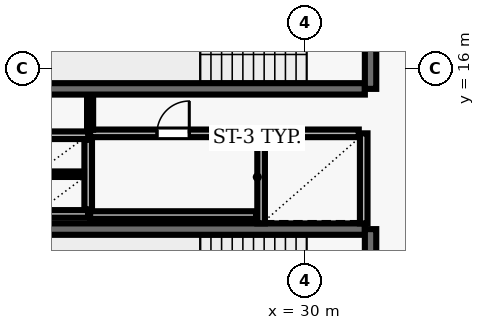
"""IFC4 building model, lengths in metres.
Left out: names, types, materials, properties, quantities, classifications, styles, units other than length and angle.
Written with IfcOpenShell. Run it as: python <this file> out.ifc"""

import sys

from ifc_helpers import new_model, si_unit, direction, frame, frame_2d, origin, place, context, subcontext, project, spatial, rectangle, extrude, element, fill, save


model = new_model("IFC4")
c1 = context("Model", 3, precision=1e-05, world=origin(), true_north=direction((0.0, 1.0)))
c2 = subcontext(c1, "Body", "Model", "MODEL_VIEW")
j1 = project(units=[si_unit("LENGTHUNIT", "METRE"), si_unit("PLANEANGLEUNIT", "RADIAN")], contexts=[c1])
p1 = place(None, origin())
s1 = spatial("IfcSite", under=j1, at=p1, CompositionType="ELEMENT")
p2 = place(p1, origin())
s2 = spatial("IfcBuilding", under=s1, at=p2, CompositionType="ELEMENT")
p3 = place(p2, frame((0.0, 0.0, 85.6)))
s3 = spatial("IfcBuildingStorey", under=s2, at=p3, CompositionType="ELEMENT", Elevation=85.6)
p4 = place(p3, frame((23.22, 15.47, 0.0), z_axis=(0.0, 0.0, 1.0), x_axis=(1.0, 0.0, 0.0)))
e1 = element("IfcWall", 1, at=p4, inside=s3, PredefinedType="SHEAR", context=c2, shape_type="SweptSolid", body=[
    extrude(rectangle(XDim=8.36, YDim=0.3, at=frame_2d((4.18, 0.0))), origin(), (0.0, 0.0, 1.0), 3.69),
])
p5 = place(p3, frame((31.73, 15.47, 0.0), z_axis=(0.0, 0.0, 1.0), x_axis=(0.0, 1.0, 0.0)))
e2 = element("IfcWall", 2, at=p5, inside=s3, PredefinedType="SHEAR", context=c2, shape_type="SweptSolid", body=[
    extrude(rectangle(XDim=3.51, YDim=0.3, at=frame_2d((1.755, 0.0))), origin(), (0.0, 0.0, 1.0), 3.69),
])
p6 = place(p5, frame((1.18, 0.0, 0.0)))
e3 = element("IfcOpeningElement", 3, at=p6, cuts=e2, PredefinedType="OPENING", context=c2, shape_type="SweptSolid", body=[
    extrude(rectangle(XDim=1.15, YDim=2.15, at=frame_2d((0.575, 1.075))), frame((0.0, 0.16, 0.0), z_axis=(0.0, -1.0, 0.0), x_axis=(1.0, 0.0, 0.0)), (0.0, 0.0, 1.0), 0.32),
])
p7 = place(p3, frame((31.58, 11.78, 0.0), z_axis=(0.0, 0.0, 1.0), x_axis=(-1.0, 0.0, 0.0)))
e4 = element("IfcWall", 4, at=p7, inside=s3, PredefinedType="SHEAR", context=c2, shape_type="SweptSolid", body=[
    extrude(rectangle(XDim=8.36, YDim=0.3, at=frame_2d((4.18, 0.0))), origin(), (0.0, 0.0, 1.0), 3.69),
])
p8 = place(p3, frame((31.73, 8.27, 0.0), z_axis=(0.0, 0.0, 1.0), x_axis=(0.0, 1.0, 0.0)))
e5 = element("IfcWall", 5, at=p8, inside=s3, PredefinedType="SHEAR", context=c2, shape_type="SweptSolid", body=[
    extrude(rectangle(XDim=3.51, YDim=0.3, at=frame_2d((1.755, 0.0))), origin(), (0.0, 0.0, 1.0), 3.69),
])
p9 = place(p8, frame((1.18, 0.0, 0.0)))
e6 = element("IfcOpeningElement", 6, at=p9, cuts=e5, PredefinedType="OPENING", context=c2, shape_type="SweptSolid", body=[
    extrude(rectangle(XDim=1.15, YDim=2.15, at=frame_2d((0.575, 1.075))), frame((0.0, 0.16, 0.0), z_axis=(0.0, -1.0, 0.0), x_axis=(1.0, 0.0, 0.0)), (0.0, 0.0, 1.0), 0.32),
])
for number, where, z_axis, x_axis in (
    (7, (28.85, 14.3, 0.0), (0.0, 0.0, 1.0), (0.0, -1.0, 0.0)),
    (8, (31.55, 11.93, 0.0), (0.0, 0.0, 1.0), (0.0, 1.0, 0.0)),
):
    element("IfcWall", number, at=place(p3, frame(where, z_axis=z_axis, x_axis=x_axis)), inside=s3, PredefinedType="SOLIDWALL", context=c2, shape_type="SweptSolid", body=[
        extrude(rectangle(XDim=2.37, YDim=0.2, at=frame_2d((1.185, 0.0))), origin(), (0.0, 0.0, 1.0), 3.69),
    ])
p10 = place(p3, frame((31.42, 14.3, 0.0), z_axis=(0.0, 0.0, 1.0), x_axis=(-1.0, 0.0, 0.0)))
e9 = element("IfcWall", 9, at=p10, inside=s3, PredefinedType="SOLIDWALL", context=c2, shape_type="SweptSolid", body=[
    extrude(rectangle(XDim=2.44, YDim=0.2, at=frame_2d((1.22, 0.0))), origin(), (0.0, 0.0, 1.0), 3.69),
])
for number, where, z_axis, x_axis in (
    (10, (22.9, 14.25, 0.0), (0.0, 0.0, 1.0), (1.0, 0.0, 0.0)),
    (11, (22.9, 12.18, 0.0), (0.0, 0.0, 1.0), (1.0, 0.0, 0.0)),
):
    element("IfcWall", number, at=place(p3, frame(where, z_axis=z_axis, x_axis=x_axis)), inside=s3, PredefinedType="SOLIDWALL", context=c2, shape_type="SweptSolid", body=[
        extrude(rectangle(XDim=1.4, YDim=0.2, at=frame_2d((0.7, 0.0))), origin(), (0.0, 0.0, 1.0), 3.69),
    ])
p11 = place(p3, frame((24.3, 12.3, 0.0), z_axis=(0.0, 0.0, 1.0), x_axis=(0.0, 1.0, 0.0)))
e12 = element("IfcWall", 12, at=p11, inside=s3, PredefinedType="SOLIDWALL", context=c2, shape_type="SweptSolid", body=[
    extrude(rectangle(XDim=1.83, YDim=0.2, at=frame_2d((0.915, 0.0))), origin(), (0.0, 0.0, 1.0), 3.69),
])
p12 = place(p3, frame((23.01, 13.225, 0.0), z_axis=(0.0, 0.0, 1.0), x_axis=(1.0, 0.0, 0.0)))
e13 = element("IfcWall", 13, at=p12, inside=s3, PredefinedType="PARTITIONING", context=c2, shape_type="SweptSolid", body=[
    extrude(rectangle(XDim=1.18, YDim=0.145, at=frame_2d((0.59, 0.0))), origin(), (0.0, 0.0, 1.0), 3.69),
])
p13 = place(p3, frame((24.35, 12.15, 0.0), z_axis=(0.0, 0.0, 1.0), x_axis=(1.0, 0.0, 0.0)))
e14 = element("IfcWall", 14, at=p13, inside=s3, PredefinedType="SOLIDWALL", context=c2, shape_type="SweptSolid", body=[
    extrude(rectangle(XDim=4.37, YDim=0.2, at=frame_2d((2.185, 0.0))), origin(), (0.0, 0.0, 1.0), 3.69),
])
p14 = place(p3, frame((24.35, 14.3, 0.0), z_axis=(0.0, 0.0, 1.0), x_axis=(1.0, 0.0, 0.0)))
e15 = element("IfcWall", 15, at=p14, inside=s3, PredefinedType="SOLIDWALL", context=c2, shape_type="SweptSolid", body=[
    extrude(rectangle(XDim=4.37, YDim=0.2, at=frame_2d((2.185, 0.0))), origin(), (0.0, 0.0, 1.0), 3.69),
])
p15 = place(p14, frame((1.76, 0.0, 0.0)))
e16 = element("IfcOpeningElement", 16, at=p15, cuts=e15, PredefinedType="OPENING", context=c2, shape_type="SweptSolid", body=[
    extrude(rectangle(XDim=0.85, YDim=2.1, at=frame_2d((0.425, 1.05))), frame((0.0, 0.11, 0.0), z_axis=(0.0, -1.0, 0.0), x_axis=(1.0, 0.0, 0.0)), (0.0, 0.0, 1.0), 0.22),
])
p16 = place(p3, frame((24.35, 15.29, 0.0), z_axis=(0.0, 0.0, 1.0), x_axis=(0.0, -1.0, 0.0)))
e17 = element("IfcWall", 17, at=p16, inside=s3, PredefinedType="PARTITIONING", context=c2, shape_type="SweptSolid", body=[
    extrude(rectangle(XDim=0.895, YDim=0.16, at=frame_2d((0.448, 0.0))), origin(), (0.0, 0.0, 1.0), 3.69),
])
p17 = place(p15, origin())
e18 = element("IfcDoor", 18, at=p17, inside=s3, OperationType="SINGLE_SWING_RIGHT", PredefinedType="DOOR", context=c2, shape_type="SweptSolid", body=[
    extrude(rectangle(XDim=0.85, YDim=2.1, at=frame_2d((0.425, 1.05))), frame((0.0, 0.025, 0.0), z_axis=(0.0, -1.0, 0.0), x_axis=(1.0, 0.0, 0.0)), (0.0, 0.0, 1.0), 0.05),
])
fill(e16, e18)
save(model, sys.argv[1])
